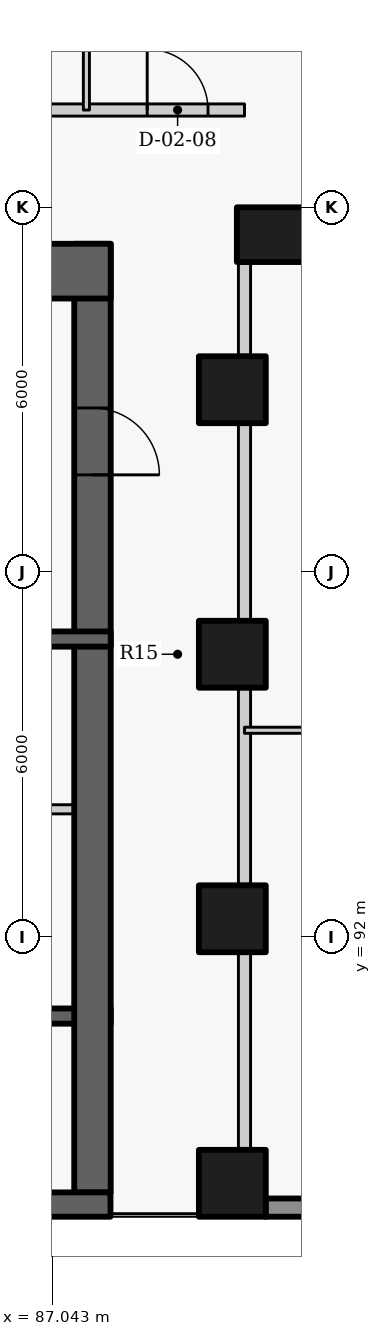
"""IFC4 building model, lengths in metres.
Left out: names, types, materials, properties, quantities, classifications, styles, units other than length and angle.
Written with IfcOpenShell. Run it as: python <this file> out.ifc"""

import sys

from ifc_helpers import new_model, si_unit, direction, frame, frame_2d, origin, origin_2d, place, context, subcontext, project, spatial, rectangle, extrude, element, fill, save


model = new_model("IFC4")
c1 = context("Model", 3, precision=1e-05, world=origin(), true_north=direction((0.0, 1.0)))
c2 = subcontext(c1, "Body", "Model", "MODEL_VIEW")
j1 = project(units=[si_unit("LENGTHUNIT", "METRE"), si_unit("PLANEANGLEUNIT", "RADIAN")], contexts=[c1])
p1 = place(None, origin())
s1 = spatial("IfcSite", under=j1, at=p1, CompositionType="ELEMENT")
p2 = place(p1, origin())
s2 = spatial("IfcBuilding", under=s1, at=p2, CompositionType="ELEMENT")
p3 = place(p2, frame((0.0, 0.0, 15.6)))
s3 = spatial("IfcBuildingStorey", under=s2, at=p3, CompositionType="ELEMENT", Elevation=15.6)
p4 = place(p3, frame((90.825, 103.55, 0.0), z_axis=(0.0, 0.0, 1.0), x_axis=(-1.0, 0.0, 0.0)))
e1 = element("IfcColumn", 1, at=p4, inside=s3, PredefinedType="COLUMN", context=c2, shape_type="SweptSolid", body=[
    extrude(rectangle(XDim=1.5, YDim=0.9, at=origin_2d()), origin(), (0.0, 0.0, 1.0), 4.2),
])
for number, where, z_axis, x_axis in (
    (2, (90.0, 87.95, 0.0), (0.0, 0.0, 1.0), (0.0, 1.0, 0.0)),
    (3, (90.0, 92.3, 0.0), (0.0, 0.0, 1.0), (0.0, 1.0, 0.0)),
    (4, (90.0, 96.65, 0.0), (0.0, 0.0, 1.0), (0.0, 1.0, 0.0)),
    (5, (90.0, 101.0, 0.0), (0.0, 0.0, 1.0), (0.0, 1.0, 0.0)),
):
    element("IfcColumn", number, at=place(p3, frame(where, z_axis=z_axis, x_axis=x_axis)), inside=s3, PredefinedType="COLUMN", context=c2, shape_type="SweptSolid", body=[
        extrude(rectangle(XDim=1.1, YDim=1.1, at=origin_2d()), origin(), (0.0, 0.0, 1.0), 4.2),
    ])
p5 = place(p3, frame((90.546, 87.55, 0.0), z_axis=(0.0, 0.0, 1.0), x_axis=(1.0, 0.0, 0.0)))
e6 = element("IfcWall", 6, at=p5, inside=s3, PredefinedType="SOLIDWALL", context=c2, shape_type="SweptSolid", body=[
    extrude(rectangle(XDim=6.016, YDim=0.3, at=frame_2d((3.008, 0.0))), origin(), (0.0, 0.0, 1.0), 3.0),
])
p6 = place(p5, frame((1.958, 0.0, 0.9)))
e7 = element("IfcOpeningElement", 7, at=p6, cuts=e6, PredefinedType="OPENING", context=c2, shape_type="SweptSolid", body=[
    extrude(rectangle(XDim=2.1, YDim=2.05, at=frame_2d((1.05, 1.025))), frame((0.0, 0.16, 0.0), z_axis=(0.0, -1.0, 0.0), x_axis=(1.0, 0.0, 0.0)), (0.0, 0.0, 1.0), 0.32),
])
p7 = place(p3, frame((88.0, 90.7, -0.3), z_axis=(0.0, 0.0, 1.0), x_axis=(-1.0, 0.0, 0.0)))
e8 = element("IfcWall", 8, at=p7, inside=s3, PredefinedType="SHEAR", context=c2, shape_type="SweptSolid", body=[
    extrude(rectangle(XDim=2.6, YDim=0.25, at=frame_2d((1.3, 0.0))), origin(), (0.0, 0.0, 1.0), 4.2),
])
p8 = place(p7, frame((1.175, 0.0, 0.3)))
e9 = element("IfcOpeningElement", 9, at=p8, cuts=e8, PredefinedType="OPENING", context=c2, shape_type="SweptSolid", body=[
    extrude(rectangle(XDim=0.9, YDim=2.1, at=frame_2d((0.45, 1.05))), frame((0.0, 0.135, 0.0), z_axis=(0.0, -1.0, 0.0), x_axis=(1.0, 0.0, 0.0)), (0.0, 0.0, 1.0), 0.27),
])
p9 = place(p3, frame((87.7, 103.4, -0.3), z_axis=(0.0, 0.0, 1.0), x_axis=(0.0, -1.0, 0.0)))
e10 = element("IfcWall", 10, at=p9, inside=s3, PredefinedType="SHEAR", context=c2, shape_type="SweptSolid", body=[
    extrude(rectangle(XDim=15.6, YDim=0.6, at=frame_2d((7.8, 0.0))), origin(), (0.0, 0.0, 1.0), 4.2),
])
p10 = place(p9, frame((2.7, 0.0, 0.3)))
e11 = element("IfcOpeningElement", 11, at=p10, cuts=e10, PredefinedType="OPENING", context=c2, shape_type="SweptSolid", body=[
    extrude(rectangle(XDim=1.1, YDim=2.1, at=frame_2d((0.55, 1.05))), frame((0.0, 0.31, 0.0), z_axis=(0.0, -1.0, 0.0), x_axis=(1.0, 0.0, 0.0)), (0.0, 0.0, 1.0), 0.62),
])
p11 = place(p3, frame((85.397, 94.1, 0.0), z_axis=(0.0, 0.0, 1.0), x_axis=(1.0, 0.0, 0.0)))
e12 = element("IfcWall", 12, at=p11, inside=s3, PredefinedType="PARTITIONING", context=c2, shape_type="SweptSolid", body=[
    extrude(rectangle(XDim=2.603, YDim=0.15, at=frame_2d((1.302, 0.0))), origin(), (0.0, 0.0, 1.0), 3.9),
])
p12 = place(p11, frame((0.528, 0.0, 0.0)))
e13 = element("IfcOpeningElement", 13, at=p12, cuts=e12, PredefinedType="OPENING", context=c2, shape_type="SweptSolid", body=[
    extrude(rectangle(XDim=0.9, YDim=2.1, at=frame_2d((0.45, 1.05))), frame((0.0, 0.085, 0.0), z_axis=(0.0, -1.0, 0.0), x_axis=(1.0, 0.0, 0.0)), (0.0, 0.0, 1.0), 0.17),
])
p13 = place(p3, frame((80.0, 96.9, -0.3), z_axis=(0.0, 0.0, 1.0), x_axis=(1.0, 0.0, 0.0)))
e14 = element("IfcWall", 14, at=p13, inside=s3, PredefinedType="SHEAR", context=c2, shape_type="SweptSolid", body=[
    extrude(rectangle(XDim=8.0, YDim=0.25, at=frame_2d((4.0, 0.0))), origin(), (0.0, 0.0, 1.0), 4.2),
])
p14 = place(p13, frame((3.849, 0.0, 0.3)))
e15 = element("IfcOpeningElement", 15, at=p14, cuts=e14, PredefinedType="OPENING", context=c2, shape_type="SweptSolid", body=[
    extrude(rectangle(XDim=1.1, YDim=2.1, at=frame_2d((0.55, 1.05))), frame((0.0, 0.135, 0.0), z_axis=(0.0, -1.0, 0.0), x_axis=(1.0, 0.0, 0.0)), (0.0, 0.0, 1.0), 0.27),
])
p15 = place(p3, frame((83.4, 102.95, -0.3), z_axis=(0.0, 0.0, 1.0), x_axis=(1.0, 0.0, 0.0)))
e16 = element("IfcWall", 16, at=p15, inside=s3, PredefinedType="SHEAR", context=c2, shape_type="SweptSolid", body=[
    extrude(rectangle(XDim=4.6, YDim=0.9, at=frame_2d((2.3, 0.0))), origin(), (0.0, 0.0, 1.0), 4.2),
])
p16 = place(p15, frame((1.748, 0.0, 0.3)))
e17 = element("IfcOpeningElement", 17, at=p16, cuts=e16, PredefinedType="OPENING", context=c2, shape_type="SweptSolid", body=[
    extrude(rectangle(XDim=1.1, YDim=2.1, at=frame_2d((0.55, 1.05))), frame((0.0, 0.46, 0.0), z_axis=(0.0, -1.0, 0.0), x_axis=(1.0, 0.0, 0.0)), (0.0, 0.0, 1.0), 0.92),
])
p17 = place(p3, frame((69.8, 105.6, 0.0), z_axis=(0.0, 0.0, 1.0), x_axis=(1.0, 0.0, 0.0)))
e18 = element("IfcWall", 18, at=p17, inside=s3, PredefinedType="PARTITIONING", context=c2, shape_type="SweptSolid", body=[
    extrude(rectangle(XDim=20.4, YDim=0.2, at=frame_2d((10.2, 0.0))), origin(), (0.0, 0.0, 1.0), 3.9),
])
p18 = place(p17, frame((0.602, 0.0, 0.0)))
e19 = element("IfcOpeningElement", 19, at=p18, cuts=e18, PredefinedType="OPENING", context=c2, shape_type="SweptSolid", body=[
    extrude(rectangle(XDim=1.0, YDim=2.1, at=frame_2d((0.5, 1.05))), frame((0.0, 0.11, 0.0), z_axis=(0.0, -1.0, 0.0), x_axis=(1.0, 0.0, 0.0)), (0.0, 0.0, 1.0), 0.22),
])
p19 = place(p17, frame((18.8, 0.0, 0.0)))
e20 = element("IfcOpeningElement", 20, at=p19, cuts=e18, PredefinedType="OPENING", context=c2, shape_type="SweptSolid", body=[
    extrude(rectangle(XDim=1.0, YDim=2.1, at=frame_2d((0.5, 1.05))), frame((0.0, 0.11, 0.0), z_axis=(0.0, -1.0, 0.0), x_axis=(1.0, 0.0, 0.0)), (0.0, 0.0, 1.0), 0.22),
])
p20 = place(p17, frame((10.3, 0.0, 0.0)))
e21 = element("IfcOpeningElement", 21, at=p20, cuts=e18, PredefinedType="OPENING", context=c2, shape_type="SweptSolid", body=[
    extrude(rectangle(XDim=1.0, YDim=2.1, at=frame_2d((0.5, 1.05))), frame((0.0, 0.11, 0.0), z_axis=(0.0, -1.0, 0.0), x_axis=(1.0, 0.0, 0.0)), (0.0, 0.0, 1.0), 0.22),
])
p21 = place(p3, frame((90.2, 88.517, 0.0), z_axis=(0.0, 0.0, 1.0), x_axis=(0.0, 1.0, 0.0)))
e22 = element("IfcWall", 22, at=p21, inside=s3, PredefinedType="PARTITIONING", context=c2, shape_type="SweptSolid", body=[
    extrude(rectangle(XDim=3.216, YDim=0.2, at=frame_2d((1.608, 0.0))), origin(), (0.0, 0.0, 1.0), 3.13),
])
for number, where, z_axis, x_axis in (
    (23, (90.2, 92.867, 0.0), (0.0, 0.0, 1.0), (0.0, 1.0, 0.0)),
    (24, (90.2, 97.217, 0.0), (0.0, 0.0, 1.0), (0.0, 1.0, 0.0)),
):
    element("IfcWall", number, at=place(p3, frame(where, z_axis=z_axis, x_axis=x_axis)), inside=s3, PredefinedType="PARTITIONING", context=c2, shape_type="SweptSolid", body=[
        extrude(rectangle(XDim=3.216, YDim=0.2, at=frame_2d((1.608, 0.0))), origin(), (0.0, 0.0, 1.0), 3.13),
    ])
p22 = place(p3, frame((90.2, 101.567, 0.0), z_axis=(0.0, 0.0, 1.0), x_axis=(0.0, 1.0, 0.0)))
e25 = element("IfcWall", 25, at=p22, inside=s3, PredefinedType="PARTITIONING", context=c2, shape_type="SweptSolid", body=[
    extrude(rectangle(XDim=1.516, YDim=0.2, at=frame_2d((0.758, 0.0))), origin(), (0.0, 0.0, 1.0), 3.9),
])
p23 = place(p3, frame((90.2, 95.4, 0.0), z_axis=(0.0, 0.0, 1.0), x_axis=(1.0, 0.0, 0.0)))
e26 = element("IfcWall", 26, at=p23, inside=s3, PredefinedType="PARTITIONING", context=c2, shape_type="SweptSolid", body=[
    extrude(rectangle(XDim=7.366, YDim=0.1, at=frame_2d((3.683, 0.0))), origin(), (0.0, 0.0, 1.0), 3.9),
])
p24 = place(p3, frame((87.6, 105.6, 0.0), z_axis=(0.0, 0.0, 1.0), x_axis=(0.0, 1.0, 0.0)))
e27 = element("IfcWall", 27, at=p24, inside=s3, PredefinedType="PARTITIONING", context=c2, shape_type="SweptSolid", body=[
    extrude(rectangle(XDim=7.1, YDim=0.1, at=frame_2d((3.55, 0.0))), origin(), (0.0, 0.0, 1.0), 3.13),
])
p25 = place(p3, frame((72.004, 87.6, -0.3), z_axis=(0.0, 0.0, 1.0), x_axis=(1.0, 0.0, 0.0)))
e28 = element("IfcWall", 28, at=p25, inside=s3, PredefinedType="SHEAR", context=c2, shape_type="SweptSolid", body=[
    extrude(rectangle(XDim=15.992, YDim=0.4, at=frame_2d((7.996, 0.0))), origin(), (0.0, 0.0, 1.0), 4.2),
])
p26 = place(p19, origin())
e29 = element("IfcDoor", 29, at=p26, inside=s3, OperationType="SINGLE_SWING_LEFT", PredefinedType="DOOR", context=c2, shape_type="SweptSolid", body=[
    extrude(rectangle(XDim=1.0, YDim=2.1, at=frame_2d((0.5, 1.05))), frame((0.0, 0.025, 0.0), z_axis=(0.0, -1.0, 0.0), x_axis=(1.0, 0.0, 0.0)), (0.0, 0.0, 1.0), 0.05),
])
fill(e20, e29)
p27 = place(p10, origin())
e30 = element("IfcDoor", 30, at=p27, inside=s3, OperationType="SINGLE_SWING_RIGHT", PredefinedType="DOOR", context=c2, shape_type="SweptSolid", body=[
    extrude(rectangle(XDim=1.1, YDim=2.1, at=frame_2d((0.55, 1.05))), frame((0.0, 0.025, 0.0), z_axis=(0.0, -1.0, 0.0), x_axis=(1.0, 0.0, 0.0)), (0.0, 0.0, 1.0), 0.05),
])
fill(e11, e30)
save(model, sys.argv[1])
